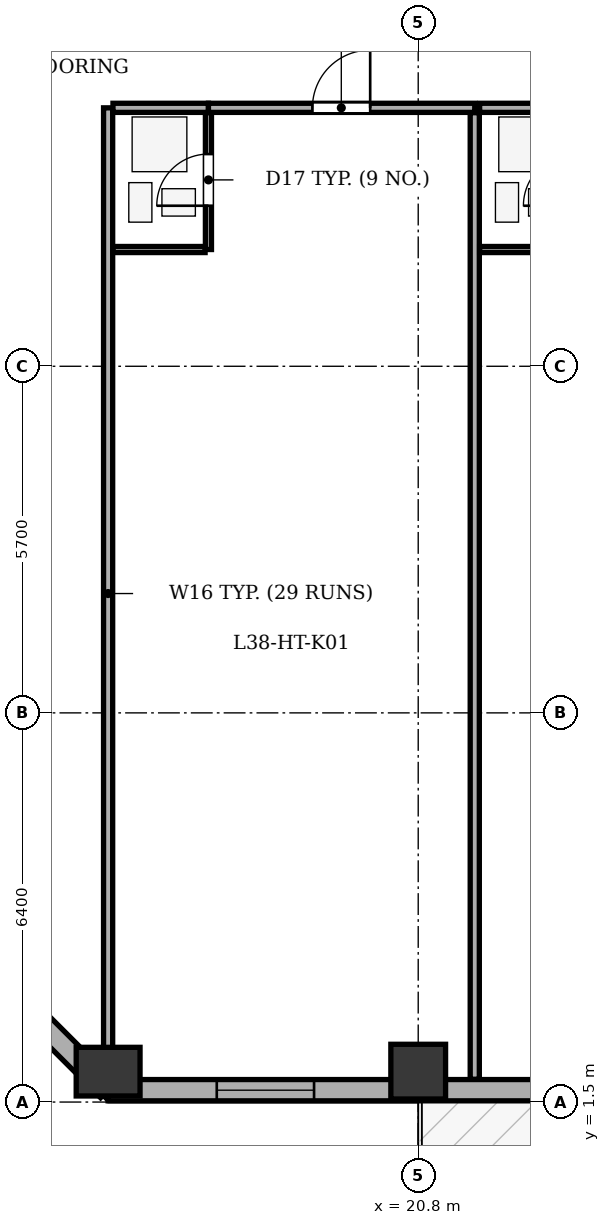
"""IFC4 building model, lengths in metres.
Left out: names, types, materials, properties, quantities, classifications, styles, units other than length and angle.
Written with IfcOpenShell. Run it as: python <this file> out.ifc"""

import sys

from ifc_helpers import new_model, si_unit, direction, frame, frame_2d, origin, origin_2d, place, context, subcontext, project, spatial, rectangle, extrude, element, fill, save


model = new_model("IFC4")
c1 = context("Model", 3, precision=1e-05, world=origin(), true_north=direction((0.0, 1.0)))
c2 = subcontext(c1, "Body", "Model", "MODEL_VIEW")
j1 = project(units=[si_unit("LENGTHUNIT", "METRE"), si_unit("PLANEANGLEUNIT", "RADIAN")], contexts=[c1])
p1 = place(None, origin())
s1 = spatial("IfcSite", under=j1, at=p1, CompositionType="ELEMENT")
p2 = place(p1, origin())
s2 = spatial("IfcBuilding", under=s1, at=p2, CompositionType="ELEMENT")
p3 = place(p2, frame((0.0, 0.0, 151.8)))
s3 = spatial("IfcBuildingStorey", under=s2, at=p3, CompositionType="ELEMENT", Elevation=151.8)
p4 = place(p3, frame((15.7, 2.0, 0.0), z_axis=(0.0, 0.0, 1.0), x_axis=(1.0, 0.0, 0.0)))
e1 = element("IfcColumn", 1, at=p4, inside=s3, PredefinedType="COLUMN", context=c2, shape_type="SweptSolid", body=[
    extrude(rectangle(XDim=0.8, YDim=1.05, at=origin_2d()), origin(), (0.0, 0.0, 1.0), 3.5),
])
p5 = place(p3, frame((20.8, 2.0, 0.0), z_axis=(0.0, 0.0, 1.0), x_axis=(1.0, 0.0, 0.0)))
e2 = element("IfcColumn", 2, at=p5, inside=s3, PredefinedType="COLUMN", context=c2, shape_type="SweptSolid", body=[
    extrude(rectangle(XDim=0.9, YDim=0.9, at=origin_2d()), origin(), (0.0, 0.0, 1.0), 3.5),
])
p6 = place(p3, frame((50.7, 1.695, 0.0), z_axis=(0.0, 0.0, 1.0), x_axis=(-1.0, 0.0, 0.0)))
e3 = element("IfcWall", 3, at=p6, inside=s3, PredefinedType="STANDARD", context=c2, shape_type="SweptSolid", body=[
    extrude(rectangle(XDim=35.0, YDim=0.35, at=frame_2d((17.5, 0.0))), origin(), (0.0, 0.0, 1.0), 2.785),
])
p7 = place(p6, frame((26.0, 0.0, 0.0)))
e4 = element("IfcOpeningElement", 4, at=p7, cuts=e3, PredefinedType="OPENING", context=c2, shape_type="SweptSolid", body=[
    extrude(rectangle(XDim=1.0, YDim=2.02, at=frame_2d((0.5, 1.01))), frame((0.0, 0.185, 0.0), z_axis=(0.0, -1.0, 0.0), x_axis=(1.0, 0.0, 0.0)), (0.0, 0.0, 1.0), 0.37),
])
p8 = place(p6, frame((1.763, 0.0, 0.75)))
e5 = element("IfcOpeningElement", 5, at=p8, cuts=e3, PredefinedType="OPENING", context=c2, shape_type="SweptSolid", body=[
    extrude(rectangle(XDim=1.6, YDim=1.75, at=frame_2d((0.8, 0.875))), frame((0.0, 0.185, 0.0), z_axis=(0.0, -1.0, 0.0), x_axis=(1.0, 0.0, 0.0)), (0.0, 0.0, 1.0), 0.37),
])
p9 = place(p6, frame((6.764, 0.0, 0.75)))
e6 = element("IfcOpeningElement", 6, at=p9, cuts=e3, PredefinedType="OPENING", context=c2, shape_type="SweptSolid", body=[
    extrude(rectangle(XDim=1.6, YDim=1.75, at=frame_2d((0.8, 0.875))), frame((0.0, 0.185, 0.0), z_axis=(0.0, -1.0, 0.0), x_axis=(1.0, 0.0, 0.0)), (0.0, 0.0, 1.0), 0.37),
])
p10 = place(p6, frame((11.989, 0.0, 0.75)))
e7 = element("IfcOpeningElement", 7, at=p10, cuts=e3, PredefinedType="OPENING", context=c2, shape_type="SweptSolid", body=[
    extrude(rectangle(XDim=1.6, YDim=1.75, at=frame_2d((0.8, 0.875))), frame((0.0, 0.185, 0.0), z_axis=(0.0, -1.0, 0.0), x_axis=(1.0, 0.0, 0.0)), (0.0, 0.0, 1.0), 0.37),
])
p11 = place(p6, frame((18.604, 0.0, 0.75)))
e8 = element("IfcOpeningElement", 8, at=p11, cuts=e3, PredefinedType="OPENING", context=c2, shape_type="SweptSolid", body=[
    extrude(rectangle(XDim=1.6, YDim=1.75, at=frame_2d((0.8, 0.875))), frame((0.0, 0.185, 0.0), z_axis=(0.0, -1.0, 0.0), x_axis=(1.0, 0.0, 0.0)), (0.0, 0.0, 1.0), 0.37),
])
p12 = place(p6, frame((31.613, 0.0, 0.75)))
e9 = element("IfcOpeningElement", 9, at=p12, cuts=e3, PredefinedType="OPENING", context=c2, shape_type="SweptSolid", body=[
    extrude(rectangle(XDim=1.6, YDim=1.75, at=frame_2d((0.8, 0.875))), frame((0.0, 0.185, 0.0), z_axis=(0.0, -1.0, 0.0), x_axis=(1.0, 0.0, 0.0)), (0.0, 0.0, 1.0), 0.37),
])
p13 = place(p3, frame((15.7, 1.695, 0.0), z_axis=(0.0, 0.0, 1.0), x_axis=(-0.707106781187, 0.707106781187, 0.0)))
e10 = element("IfcWall", 10, at=p13, inside=s3, PredefinedType="STANDARD", context=c2, shape_type="SweptSolid", body=[
    extrude(rectangle(XDim=6.795, YDim=0.35, at=frame_2d((3.397, 0.0))), origin(), (0.0, 0.0, 1.0), 2.785),
])
p14 = place(p13, frame((2.698, 0.0, 0.75)))
e11 = element("IfcOpeningElement", 11, at=p14, cuts=e10, PredefinedType="OPENING", context=c2, shape_type="SweptSolid", body=[
    extrude(rectangle(XDim=1.4, YDim=1.65, at=frame_2d((0.7, 0.825))), frame((0.0, 0.185, 0.0), z_axis=(0.0, -1.0, 0.0), x_axis=(1.0, 0.0, 0.0)), (0.0, 0.0, 1.0), 0.37),
])
p15 = place(p3, frame((15.7, 1.875, 0.0), z_axis=(0.0, 0.0, 1.0), x_axis=(0.0, 1.0, 0.0)))
e12 = element("IfcWall", 12, at=p15, inside=s3, PredefinedType="PARTITIONING", context=c2, shape_type="SweptSolid", body=[
    extrude(rectangle(XDim=15.975, YDim=0.15, at=frame_2d((7.988, 0.0))), origin(), (0.0, 0.0, 1.0), 3.2),
])
p16 = place(p3, frame((15.78, 17.85, 0.0), z_axis=(0.0, 0.0, 1.0), x_axis=(1.0, 0.0, 0.0)))
e13 = element("IfcWall", 13, at=p16, inside=s3, PredefinedType="PARTITIONING", context=c2, shape_type="SweptSolid", body=[
    extrude(rectangle(XDim=1.57, YDim=0.15, at=frame_2d((0.785, 0.0))), origin(), (0.0, 0.0, 1.0), 3.2),
])
p17 = place(p3, frame((17.35, 17.85, 0.0), z_axis=(0.0, 0.0, 1.0), x_axis=(1.0, 0.0, 0.0)))
e14 = element("IfcWall", 14, at=p17, inside=s3, PredefinedType="PARTITIONING", context=c2, shape_type="SweptSolid", body=[
    extrude(rectangle(XDim=4.38, YDim=0.15, at=frame_2d((2.19, 0.0))), origin(), (0.0, 0.0, 1.0), 3.2),
])
p18 = place(p17, frame((1.71, 0.0, 0.0)))
e15 = element("IfcOpeningElement", 15, at=p18, cuts=e14, PredefinedType="OPENING", context=c2, shape_type="SweptSolid", body=[
    extrude(rectangle(XDim=0.95, YDim=2.1, at=frame_2d((0.475, 1.05))), frame((0.0, 0.085, 0.0), z_axis=(0.0, -1.0, 0.0), x_axis=(1.0, 0.0, 0.0)), (0.0, 0.0, 1.0), 0.17),
])
p19 = place(p3, frame((17.35, 15.52, 0.0), z_axis=(0.0, 0.0, 1.0), x_axis=(0.0, 1.0, 0.0)))
e16 = element("IfcWall", 16, at=p19, inside=s3, PredefinedType="PARTITIONING", context=c2, shape_type="SweptSolid", body=[
    extrude(rectangle(XDim=2.25, YDim=0.1, at=frame_2d((1.125, 0.0))), origin(), (0.0, 0.0, 1.0), 3.2),
])
p20 = place(p19, frame((0.72, 0.0, 0.0)))
e17 = element("IfcOpeningElement", 17, at=p20, cuts=e16, PredefinedType="OPENING", context=c2, shape_type="SweptSolid", body=[
    extrude(rectangle(XDim=0.85, YDim=2.05, at=frame_2d((0.425, 1.025))), frame((0.0, 0.06, 0.0), z_axis=(0.0, -1.0, 0.0), x_axis=(1.0, 0.0, 0.0)), (0.0, 0.0, 1.0), 0.12),
])
p21 = place(p3, frame((15.78, 15.52, 0.0), z_axis=(0.0, 0.0, 1.0), x_axis=(1.0, 0.0, 0.0)))
e18 = element("IfcWall", 18, at=p21, inside=s3, PredefinedType="PARTITIONING", context=c2, shape_type="SweptSolid", body=[
    extrude(rectangle(XDim=1.515, YDim=0.1, at=frame_2d((0.757, 0.0))), origin(), (0.0, 0.0, 1.0), 3.2),
])
p22 = place(p3, frame((21.73, 1.875, 0.0), z_axis=(0.0, 0.0, 1.0), x_axis=(0.0, 1.0, 0.0)))
e19 = element("IfcWall", 19, at=p22, inside=s3, PredefinedType="PARTITIONING", context=c2, shape_type="SweptSolid", body=[
    extrude(rectangle(XDim=15.895, YDim=0.15, at=frame_2d((7.948, 0.0))), origin(), (0.0, 0.0, 1.0), 3.2),
])
p23 = place(p3, frame((21.81, 17.85, 0.0), z_axis=(0.0, 0.0, 1.0), x_axis=(1.0, 0.0, 0.0)))
e20 = element("IfcWall", 20, at=p23, inside=s3, PredefinedType="PARTITIONING", context=c2, shape_type="SweptSolid", body=[
    extrude(rectangle(XDim=1.57, YDim=0.15, at=frame_2d((0.785, 0.0))), origin(), (0.0, 0.0, 1.0), 3.2),
])
p24 = place(p3, frame((21.81, 15.52, 0.0), z_axis=(0.0, 0.0, 1.0), x_axis=(1.0, 0.0, 0.0)))
e21 = element("IfcWall", 21, at=p24, inside=s3, PredefinedType="PARTITIONING", context=c2, shape_type="SweptSolid", body=[
    extrude(rectangle(XDim=1.515, YDim=0.1, at=frame_2d((0.757, 0.0))), origin(), (0.0, 0.0, 1.0), 3.2),
])
p25 = place(p12, origin())
e22 = element("IfcWindow", 22, at=p25, inside=s3, PartitioningType="SINGLE_PANEL", PredefinedType="WINDOW", context=c2, shape_type="SweptSolid", body=[
    extrude(rectangle(XDim=1.6, YDim=1.75, at=frame_2d((0.8, 0.875))), frame((0.0, -0.01, 0.0), z_axis=(0.0, -1.0, 0.0), x_axis=(1.0, 0.0, 0.0)), (0.0, 0.0, 1.0), 0.06),
])
fill(e9, e22)
p26 = place(p20, origin())
e23 = element("IfcDoor", 23, at=p26, inside=s3, OperationType="SINGLE_SWING_LEFT", PredefinedType="DOOR", context=c2, shape_type="SweptSolid", body=[
    extrude(rectangle(XDim=0.85, YDim=2.05, at=frame_2d((0.425, 1.025))), frame((0.0, 0.025, 0.0), z_axis=(0.0, -1.0, 0.0), x_axis=(1.0, 0.0, 0.0)), (0.0, 0.0, 1.0), 0.05),
])
fill(e17, e23)
p27 = place(p18, origin())
e24 = element("IfcDoor", 24, at=p27, inside=s3, OperationType="SINGLE_SWING_RIGHT", PredefinedType="DOOR", context=c2, shape_type="SweptSolid", body=[
    extrude(rectangle(XDim=0.95, YDim=2.1, at=frame_2d((0.475, 1.05))), frame((0.0, 0.025, 0.0), z_axis=(0.0, -1.0, 0.0), x_axis=(1.0, 0.0, 0.0)), (0.0, 0.0, 1.0), 0.05),
])
fill(e15, e24)
save(model, sys.argv[1])
